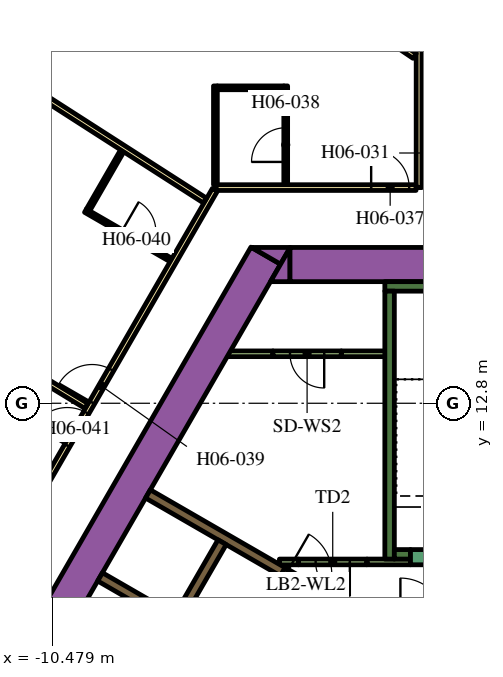
"""IFC4 building model, lengths in metres.
Left out: names, types, materials, properties, quantities, classifications, styles, units other than length and angle.
Written with IfcOpenShell. Run it as: python <this file> out.ifc"""

import sys

from ifc_helpers import new_model, si_unit, direction, frame, frame_2d, origin, place, context, subcontext, project, spatial, polyline, rectangle, outline, extrude, element, fill, save


model = new_model("IFC4")
c1 = context("Model", 3, precision=1e-05, world=origin(), true_north=direction((0.0, 1.0)))
c2 = subcontext(c1, "Body", "Model", "MODEL_VIEW")
j1 = project(units=[si_unit("LENGTHUNIT", "METRE"), si_unit("PLANEANGLEUNIT", "RADIAN")], contexts=[c1])
p1 = place(None, origin())
s1 = spatial("IfcSite", under=j1, at=p1, CompositionType="ELEMENT")
p2 = place(p1, origin())
s2 = spatial("IfcBuilding", under=s1, at=p2, CompositionType="ELEMENT")
p3 = place(p2, frame((0.0, 0.0, 87.6)))
s3 = spatial("IfcBuildingStorey", under=s2, at=p3, CompositionType="ELEMENT", Elevation=87.6)
p4 = place(p3, frame((-15.36, -1.503, 0.0), z_axis=(0.0, 0.0, 1.0), x_axis=(0.50000389221, 0.866023156604, 0.0)))
e1 = element("IfcWall", 1, at=p4, inside=s3, PredefinedType="SOLIDWALL", context=c2, shape_type="SweptSolid", body=[
    extrude(rectangle(XDim=21.0, YDim=0.9, at=frame_2d((10.5, 0.0))), origin(), (0.0, 0.0, 1.0), 3.9),
])
p5 = place(p3, origin())
e2 = element("IfcWall", 2, at=p5, inside=s3, PredefinedType="SOLIDWALL", context=c2, shape_type="SweptSolid", body=[
    extrude(outline(polyline([(-4.215, 16.9), (-4.469, 16.46), (-5.231, 16.9), (-4.215, 16.9)])), origin(), (0.0, 0.0, 1.0), 3.9),
])
p6 = place(p3, frame((-4.224, 16.45, 0.0), z_axis=(0.0, 0.0, 1.0), x_axis=(1.0, 0.0, 0.0)))
e3 = element("IfcWall", 3, at=p6, inside=s3, PredefinedType="SOLIDWALL", context=c2, shape_type="SweptSolid", body=[
    extrude(rectangle(XDim=9.488, YDim=0.9, at=frame_2d((4.744, 0.0))), origin(), (0.0, 0.0, 1.0), 3.9),
])
e4 = element("IfcWall", 4, at=p5, inside=s3, PredefinedType="SOLIDWALL", context=c2, shape_type="SweptSolid", body=[
    extrude(outline(polyline([(-4.734, 16.0), (-4.226, 16.88), (-4.226, 16.0), (-4.734, 16.0)])), origin(), (0.0, 0.0, 1.0), 3.9),
])
p7 = place(p3, frame((-1.725, 15.875, 0.0), z_axis=(0.0, 0.0, 1.0), x_axis=(1.0, 0.0, 0.0)))
e5 = element("IfcWall", 5, at=p7, inside=s3, PredefinedType="SOLIDWALL", context=c2, shape_type="SweptSolid", body=[
    extrude(rectangle(XDim=3.45, YDim=0.25, at=frame_2d((1.725, 0.0))), origin(), (0.0, 0.0, 1.0), 3.9),
])
p8 = place(p3, frame((-1.6, 8.7, 0.0), z_axis=(0.0, 0.0, 1.0), x_axis=(0.0, 1.0, 0.0)))
e6 = element("IfcWall", 6, at=p8, inside=s3, PredefinedType="SOLIDWALL", context=c2, shape_type="SweptSolid", body=[
    extrude(rectangle(XDim=7.05, YDim=0.25, at=frame_2d((3.525, 0.0))), origin(), (0.0, 0.0, 1.0), 3.9),
])
p9 = place(p3, frame((-1.475, 8.825, 0.0), z_axis=(0.0, 0.0, 1.0), x_axis=(1.0, 0.0, 0.0)))
e7 = element("IfcWall", 7, at=p9, inside=s3, PredefinedType="SOLIDWALL", context=c2, shape_type="SweptSolid", body=[
    extrude(rectangle(XDim=0.425, YDim=0.25, at=frame_2d((0.212, 0.0))), origin(), (0.0, 0.0, 1.0), 3.9),
])
e8 = element("IfcWall", 8, at=p5, inside=s3, PredefinedType="SOLIDWALL", context=c2, shape_type="SweptSolid", body=[
    extrude(outline(polyline([(-3.128, 7.481), (-3.259, 7.557), (-3.134, 7.773), (-3.003, 7.698), (-3.128, 7.481)])), origin(), (0.0, 0.0, 1.0), 3.9),
])
p10 = place(p3, frame((-7.314, 7.132, 0.0), z_axis=(0.0, 0.0, 1.0), x_axis=(-0.866008176907, 0.50002983664, 0.0)))
e9 = element("IfcWall", 9, at=p10, inside=s3, PredefinedType="SOLIDWALL", context=c2, shape_type="SweptSolid", body=[
    extrude(rectangle(XDim=2.2, YDim=0.25, at=frame_2d((1.1, 0.0))), origin(), (0.0, 0.0, 1.0), 3.9),
])
p11 = place(p3, frame((-7.959, 10.415, 0.0), z_axis=(0.0, 0.0, 1.0), x_axis=(0.866020958405, -0.500007699544, 0.0)))
e10 = element("IfcWall", 10, at=p11, inside=s3, PredefinedType="SOLIDWALL", context=c2, shape_type="SweptSolid", body=[
    extrude(rectangle(XDim=4.1, YDim=0.25, at=frame_2d((2.05, 0.0))), origin(), (0.0, 0.0, 1.0), 3.9),
])
p12 = place(p3, frame((-3.997, 8.625, 0.0), z_axis=(0.0, 0.0, 1.0), x_axis=(-1.0, 0.0, 0.0)))
e11 = element("IfcWall", 11, at=p12, inside=s3, PredefinedType="PARTITIONING", context=c2, shape_type="SweptSolid", body=[
    extrude(rectangle(XDim=0.502, YDim=0.15, at=frame_2d((0.251, 0.0))), origin(), (0.0, 0.0, 1.0), 2.75),
])
p13 = place(p3, frame((-5.851, 14.102, 0.0), z_axis=(0.0, 0.0, 1.0), x_axis=(1.0, 0.0, 0.0)))
e12 = element("IfcWall", 12, at=p13, inside=s3, PredefinedType="PARTITIONING", context=c2, shape_type="SweptSolid", body=[
    extrude(rectangle(XDim=1.18, YDim=0.15, at=frame_2d((0.59, 0.0))), origin(), (0.0, 0.0, 1.0), 2.75),
])
p14 = place(p3, frame((-2.871, 14.102, 0.0), z_axis=(0.0, 0.0, 1.0), x_axis=(1.0, 0.0, 0.0)))
e13 = element("IfcWall", 13, at=p14, inside=s3, PredefinedType="PARTITIONING", context=c2, shape_type="SweptSolid", body=[
    extrude(rectangle(XDim=1.196, YDim=0.15, at=frame_2d((0.598, 0.0))), origin(), (0.0, 0.0, 1.0), 2.75),
])
p15 = place(p3, frame((-2.196, 8.625, 0.0), z_axis=(0.0, 0.0, 1.0), x_axis=(1.0, 0.0, 0.0)))
e14 = element("IfcWall", 14, at=p15, inside=s3, PredefinedType="PARTITIONING", context=c2, shape_type="SweptSolid", body=[
    extrude(rectangle(XDim=1.146, YDim=0.15, at=frame_2d((0.573, 0.0))), origin(), (0.0, 0.0, 1.0), 2.75),
])
p16 = place(p3, frame((-6.008, 9.144, 0.0), z_axis=(0.0, 0.0, 1.0), x_axis=(-0.500006956611, -0.866021387346, 0.0)))
e15 = element("IfcWall", 15, at=p16, inside=s3, PredefinedType="SOLIDWALL", context=c2, shape_type="SweptSolid", body=[
    extrude(rectangle(XDim=9.83, YDim=0.25, at=frame_2d((4.915, 0.0))), origin(), (0.0, 0.0, 1.0), 3.9),
])
p17 = place(p16, frame((6.985, 0.0, 0.0)))
e16 = element("IfcOpeningElement", 16, at=p17, cuts=e15, PredefinedType="OPENING", context=c2, shape_type="SweptSolid", body=[
    extrude(rectangle(XDim=0.9, YDim=2.1, at=frame_2d((0.45, 1.05))), frame((0.0, 0.135, 0.0), z_axis=(0.0, -1.0, 0.0), x_axis=(1.0, 0.0, 0.0)), (0.0, 0.0, 1.0), 0.27),
])
p18 = place(p3, frame((1.05, 8.75, 0.0), z_axis=(0.0, 0.0, 1.0), x_axis=(-1.0, 0.0, 0.0)))
e17 = element("IfcWall", 17, at=p18, inside=s3, PredefinedType="SOLIDWALL", context=c2, shape_type="SweptSolid", body=[
    extrude(rectangle(XDim=2.1, YDim=0.4, at=frame_2d((1.05, 0.0))), origin(), (0.0, 0.0, 1.0), 3.9),
])
p19 = place(p18, frame((0.45, 0.0, 0.0)))
e18 = element("IfcOpeningElement", 18, at=p19, cuts=e17, PredefinedType="OPENING", context=c2, shape_type="SweptSolid", body=[
    extrude(rectangle(XDim=1.2, YDim=2.1, at=frame_2d((0.6, 1.05))), frame((0.0, 0.21, 0.0), z_axis=(0.0, -1.0, 0.0), x_axis=(1.0, 0.0, 0.0)), (0.0, 0.0, 1.0), 0.42),
])
p20 = place(p3, frame((-2.196, 8.625, 0.0), z_axis=(0.0, 0.0, 1.0), x_axis=(-1.0, 0.0, 0.0)))
e19 = element("IfcWall", 19, at=p20, inside=s3, PredefinedType="PARTITIONING", context=c2, shape_type="SweptSolid", body=[
    extrude(rectangle(XDim=1.8, YDim=0.15, at=frame_2d((0.9, 0.0))), origin(), (0.0, 0.0, 1.0), 2.75),
])
p21 = place(p20, frame((0.45, 0.0, 0.0)))
e20 = element("IfcOpeningElement", 20, at=p21, cuts=e19, PredefinedType="OPENING", context=c2, shape_type="SweptSolid", body=[
    extrude(rectangle(XDim=0.9, YDim=2.1, at=frame_2d((0.45, 1.05))), frame((0.0, 0.085, 0.0), z_axis=(0.0, -1.0, 0.0), x_axis=(1.0, 0.0, 0.0)), (0.0, 0.0, 1.0), 0.17),
])
p22 = place(p3, frame((-4.409, 8.365, 0.0), z_axis=(0.0, 0.0, 1.0), x_axis=(0.866034573852, -0.49998411664, 0.0)))
e21 = element("IfcWall", 21, at=p22, inside=s3, PredefinedType="SOLIDWALL", context=c2, shape_type="SweptSolid", body=[
    extrude(rectangle(XDim=1.4, YDim=0.25, at=frame_2d((0.7, 0.0))), origin(), (0.0, 0.0, 1.0), 3.9),
])
p23 = place(p22, frame((0.1, 0.0, 0.0)))
e22 = element("IfcOpeningElement", 22, at=p23, cuts=e21, PredefinedType="OPENING", context=c2, shape_type="SweptSolid", body=[
    extrude(rectangle(XDim=1.2, YDim=2.1, at=frame_2d((0.6, 1.05))), frame((0.0, 0.135, 0.0), z_axis=(0.0, -1.0, 0.0), x_axis=(1.0, 0.0, 0.0)), (0.0, 0.0, 1.0), 0.27),
])
p24 = place(p3, frame((-2.871, 14.102, 0.0), z_axis=(0.0, 0.0, 1.0), x_axis=(-1.0, 0.0, 0.0)))
e23 = element("IfcWall", 23, at=p24, inside=s3, PredefinedType="PARTITIONING", context=c2, shape_type="SweptSolid", body=[
    extrude(rectangle(XDim=1.8, YDim=0.15, at=frame_2d((0.9, 0.0))), origin(), (0.0, 0.0, 1.0), 2.75),
])
p25 = place(p24, frame((0.45, 0.0, 0.0)))
e24 = element("IfcOpeningElement", 24, at=p25, cuts=e23, PredefinedType="OPENING", context=c2, shape_type="SweptSolid", body=[
    extrude(rectangle(XDim=0.9, YDim=2.1, at=frame_2d((0.45, 1.05))), frame((0.0, 0.085, 0.0), z_axis=(0.0, -1.0, 0.0), x_axis=(1.0, 0.0, 0.0)), (0.0, 0.0, 1.0), 0.17),
])
p26 = place(p3, frame((-0.825, 18.475, 0.0), z_axis=(0.0, 0.0, 1.0), x_axis=(0.0, 1.0, 0.0)))
e25 = element("IfcWall", 25, at=p26, inside=s3, PredefinedType="PARTITIONING", context=c2, shape_type="SweptSolid", body=[
    extrude(rectangle(XDim=13.623, YDim=0.15, at=frame_2d((6.812, 0.0))), origin(), (0.0, 0.0, 1.0), 2.75),
])
p27 = place(p26, frame((4.135, 0.0, 0.0)))
e26 = element("IfcOpeningElement", 26, at=p27, cuts=e25, PredefinedType="OPENING", context=c2, shape_type="SweptSolid", body=[
    extrude(rectangle(XDim=1.0, YDim=2.1, at=frame_2d((0.5, 1.05))), frame((0.0, 0.085, 0.0), z_axis=(0.0, -1.0, 0.0), x_axis=(1.0, 0.0, 0.0)), (0.0, 0.0, 1.0), 0.17),
])
p28 = place(p3, frame((-6.163, 18.475, 0.0), z_axis=(0.0, 0.0, 1.0), x_axis=(1.0, 0.0, 0.0)))
e27 = element("IfcWall", 27, at=p28, inside=s3, PredefinedType="PARTITIONING", context=c2, shape_type="SweptSolid", body=[
    extrude(rectangle(XDim=5.258, YDim=0.15, at=frame_2d((2.629, 0.0))), origin(), (0.0, 0.0, 1.0), 2.75),
])
p29 = place(p28, frame((4.078, 0.0, 0.0)))
e28 = element("IfcOpeningElement", 28, at=p29, cuts=e27, PredefinedType="OPENING", context=c2, shape_type="SweptSolid", body=[
    extrude(rectangle(XDim=1.0, YDim=2.1, at=frame_2d((0.5, 1.05))), frame((0.0, 0.085, 0.0), z_axis=(0.0, -1.0, 0.0), x_axis=(1.0, 0.0, 0.0)), (0.0, 0.0, 1.0), 0.17),
])
p30 = place(p3, frame((-19.081, -3.9, 0.0), z_axis=(0.0, 0.0, 1.0), x_axis=(0.499998313975, 0.866026377209, 0.0)))
e29 = element("IfcWall", 29, at=p30, inside=s3, PredefinedType="PARTITIONING", context=c2, shape_type="SweptSolid", body=[
    extrude(rectangle(XDim=25.766, YDim=0.15, at=frame_2d((12.883, 0.0))), origin(), (0.0, 0.0, 1.0), 2.75),
])
p31 = place(p30, frame((19.306, 0.0, 0.0)))
e30 = element("IfcOpeningElement", 30, at=p31, cuts=e29, PredefinedType="OPENING", context=c2, shape_type="SweptSolid", body=[
    extrude(rectangle(XDim=1.0, YDim=2.1, at=frame_2d((0.5, 1.05))), frame((0.0, 0.085, 0.0), z_axis=(0.0, -1.0, 0.0), x_axis=(1.0, 0.0, 0.0)), (0.0, 0.0, 1.0), 0.17),
])
p32 = place(p30, frame((18.0, 0.0, 0.0)))
e31 = element("IfcOpeningElement", 31, at=p32, cuts=e29, PredefinedType="OPENING", context=c2, shape_type="SweptSolid", body=[
    extrude(rectangle(XDim=1.0, YDim=2.1, at=frame_2d((0.5, 1.05))), frame((0.0, 0.085, 0.0), z_axis=(0.0, -1.0, 0.0), x_axis=(1.0, 0.0, 0.0)), (0.0, 0.0, 1.0), 0.17),
])
p33 = place(p30, frame((10.874, 0.0, 0.0)))
e32 = element("IfcOpeningElement", 32, at=p33, cuts=e29, PredefinedType="OPENING", context=c2, shape_type="SweptSolid", body=[
    extrude(rectangle(XDim=0.9, YDim=2.1, at=frame_2d((0.45, 1.05))), frame((0.0, 0.085, 0.0), z_axis=(0.0, -1.0, 0.0), x_axis=(1.0, 0.0, 0.0)), (0.0, 0.0, 1.0), 0.17),
])
p34 = place(p30, frame((8.548, 0.0, 0.0)))
e33 = element("IfcOpeningElement", 33, at=p34, cuts=e29, PredefinedType="OPENING", context=c2, shape_type="SweptSolid", body=[
    extrude(rectangle(XDim=1.1, YDim=2.1, at=frame_2d((0.55, 1.05))), frame((0.0, 0.085, 0.0), z_axis=(0.0, -1.0, 0.0), x_axis=(1.0, 0.0, 0.0)), (0.0, 0.0, 1.0), 0.17),
])
p35 = place(p30, frame((0.18, 0.0, 0.0)))
e34 = element("IfcOpeningElement", 34, at=p35, cuts=e29, PredefinedType="OPENING", context=c2, shape_type="SweptSolid", body=[
    extrude(rectangle(XDim=1.0, YDim=2.1, at=frame_2d((0.5, 1.05))), frame((0.0, 0.085, 0.0), z_axis=(0.0, -1.0, 0.0), x_axis=(1.0, 0.0, 0.0)), (0.0, 0.0, 1.0), 0.17),
])
p36 = place(p3, frame((-15.225, 16.167, 0.0), z_axis=(0.0, 0.0, 1.0), x_axis=(0.854088713274, -0.520127359266, 0.0)))
e35 = element("IfcWall", 35, at=p36, inside=s3, PredefinedType="PARTITIONING", context=c2, shape_type="SweptSolid", body=[
    extrude(rectangle(XDim=6.611, YDim=0.15, at=frame_2d((3.305, 0.0))), origin(), (0.0, 0.0, 1.0), 2.75),
])
p37 = place(p3, frame((-11.838, 21.585, 0.0), z_axis=(0.0, 0.0, 1.0), x_axis=(0.841699322813, -0.539946525108, 0.0)))
e36 = element("IfcWall", 36, at=p37, inside=s3, PredefinedType="PARTITIONING", context=c2, shape_type="SweptSolid", body=[
    extrude(rectangle(XDim=6.392, YDim=0.15, at=frame_2d((3.196, 0.0))), origin(), (0.0, 0.0, 1.0), 2.75),
])
p38 = place(p3, frame((-8.326, 26.923, 0.0), z_axis=(0.0, 0.0, 1.0), x_axis=(0.828836601893, -0.5594907393, 0.0)))
e37 = element("IfcWall", 37, at=p38, inside=s3, PredefinedType="PARTITIONING", context=c2, shape_type="SweptSolid", body=[
    extrude(rectangle(XDim=8.909, YDim=0.15, at=frame_2d((4.455, 0.0))), origin(), (0.0, 0.0, 1.0), 2.75),
])
p39 = place(p3, frame((-4.333, 18.55, 0.0), z_axis=(0.0, 0.0, 1.0), x_axis=(0.0, 1.0, 0.0)))
e38 = element("IfcWall", 38, at=p39, inside=s3, PredefinedType="PARTITIONING", context=c2, shape_type="SweptSolid", body=[
    extrude(rectangle(XDim=2.6, YDim=0.1, at=frame_2d((1.3, 0.0))), origin(), (0.0, 0.0, 1.0), 2.75),
])
p40 = place(p39, frame((0.6, 0.0, 0.0)))
e39 = element("IfcOpeningElement", 39, at=p40, cuts=e38, PredefinedType="OPENING", context=c2, shape_type="SweptSolid", body=[
    extrude(rectangle(XDim=0.9, YDim=2.1, at=frame_2d((0.45, 1.05))), frame((0.0, 0.06, 0.0), z_axis=(0.0, -1.0, 0.0), x_axis=(1.0, 0.0, 0.0)), (0.0, 0.0, 1.0), 0.12),
])
p41 = place(p3, frame((-4.383, 21.1, 0.0), z_axis=(0.0, 0.0, 1.0), x_axis=(-1.0, 0.0, 0.0)))
e40 = element("IfcWall", 40, at=p41, inside=s3, PredefinedType="PARTITIONING", context=c2, shape_type="SweptSolid", body=[
    extrude(rectangle(XDim=1.75, YDim=0.1, at=frame_2d((0.875, 0.0))), origin(), (0.0, 0.0, 1.0), 2.75),
])
p42 = place(p3, frame((-6.183, 18.55, 0.0), z_axis=(0.0, 0.0, 1.0), x_axis=(0.0, 1.0, 0.0)))
e41 = element("IfcWall", 41, at=p42, inside=s3, PredefinedType="PARTITIONING", context=c2, shape_type="SweptSolid", body=[
    extrude(rectangle(XDim=2.6, YDim=0.1, at=frame_2d((1.3, 0.0))), origin(), (0.0, 0.0, 1.0), 2.75),
])
p43 = place(p3, frame((-9.603, 17.868, 0.0), z_axis=(0.0, 0.0, 1.0), x_axis=(0.866021400173, -0.500006934395, 0.0)))
e42 = element("IfcWall", 42, at=p43, inside=s3, PredefinedType="PARTITIONING", context=c2, shape_type="SweptSolid", body=[
    extrude(rectangle(XDim=2.6, YDim=0.1, at=frame_2d((1.3, 0.0))), origin(), (0.0, 0.0, 1.0), 2.75),
])
p44 = place(p43, frame((1.1, 0.0, 0.0)))
e43 = element("IfcOpeningElement", 43, at=p44, cuts=e42, PredefinedType="OPENING", context=c2, shape_type="SweptSolid", body=[
    extrude(rectangle(XDim=0.9, YDim=2.1, at=frame_2d((0.45, 1.05))), frame((0.0, 0.06, 0.0), z_axis=(0.0, -1.0, 0.0), x_axis=(1.0, 0.0, 0.0)), (0.0, 0.0, 1.0), 0.12),
])
p45 = place(p3, frame((-9.534, 17.886, 0.0), z_axis=(0.0, 0.0, 1.0), x_axis=(0.500041240653, 0.866001592173, 0.0)))
e44 = element("IfcWall", 44, at=p45, inside=s3, PredefinedType="PARTITIONING", context=c2, shape_type="SweptSolid", body=[
    extrude(rectangle(XDim=1.79, YDim=0.1, at=frame_2d((0.895, 0.0))), origin(), (0.0, 0.0, 1.0), 2.75),
])
p46 = place(p21, origin())
e45 = element("IfcDoor", 45, at=p46, inside=s3, OperationType="SINGLE_SWING_LEFT", PredefinedType="DOOR", context=c2, shape_type="SweptSolid", body=[
    extrude(rectangle(XDim=0.9, YDim=2.1, at=frame_2d((0.45, 1.05))), frame((0.0, 0.025, 0.0), z_axis=(0.0, -1.0, 0.0), x_axis=(1.0, 0.0, 0.0)), (0.0, 0.0, 1.0), 0.05),
])
fill(e20, e45)
p47 = place(p23, origin())
e46 = element("IfcDoor", 46, at=p47, inside=s3, OperationType="SINGLE_SWING_LEFT", PredefinedType="DOOR", context=c2, shape_type="SweptSolid", body=[
    extrude(rectangle(XDim=1.2, YDim=2.1, at=frame_2d((0.6, 1.05))), frame((0.0, 0.025, 0.0), z_axis=(0.0, -1.0, 0.0), x_axis=(1.0, 0.0, 0.0)), (0.0, 0.0, 1.0), 0.05),
])
fill(e22, e46)
p48 = place(p25, origin())
e47 = element("IfcDoor", 47, at=p48, inside=s3, OperationType="SINGLE_SWING_LEFT", PredefinedType="DOOR", context=c2, shape_type="SweptSolid", body=[
    extrude(rectangle(XDim=0.9, YDim=2.1, at=frame_2d((0.45, 1.05))), frame((0.0, 0.025, 0.0), z_axis=(0.0, -1.0, 0.0), x_axis=(1.0, 0.0, 0.0)), (0.0, 0.0, 1.0), 0.05),
])
fill(e24, e47)
p49 = place(p29, origin())
e48 = element("IfcDoor", 48, at=p49, inside=s3, OperationType="SINGLE_SWING_RIGHT", PredefinedType="DOOR", context=c2, shape_type="SweptSolid", body=[
    extrude(rectangle(XDim=1.0, YDim=2.1, at=frame_2d((0.5, 1.05))), frame((0.0, 0.025, 0.0), z_axis=(0.0, -1.0, 0.0), x_axis=(1.0, 0.0, 0.0)), (0.0, 0.0, 1.0), 0.05),
])
fill(e28, e48)
p50 = place(p40, origin())
e49 = element("IfcDoor", 49, at=p50, inside=s3, OperationType="SINGLE_SWING_LEFT", PredefinedType="DOOR", context=c2, shape_type="SweptSolid", body=[
    extrude(rectangle(XDim=0.9, YDim=2.1, at=frame_2d((0.45, 1.05))), frame((0.0, 0.025, 0.0), z_axis=(0.0, -1.0, 0.0), x_axis=(1.0, 0.0, 0.0)), (0.0, 0.0, 1.0), 0.05),
])
fill(e39, e49)
p51 = place(p31, origin())
e50 = element("IfcDoor", 50, at=p51, inside=s3, OperationType="SINGLE_SWING_LEFT", PredefinedType="DOOR", context=c2, shape_type="SweptSolid", body=[
    extrude(rectangle(XDim=1.0, YDim=2.1, at=frame_2d((0.5, 1.05))), frame((0.0, 0.025, 0.0), z_axis=(0.0, -1.0, 0.0), x_axis=(1.0, 0.0, 0.0)), (0.0, 0.0, 1.0), 0.05),
])
fill(e30, e50)
p52 = place(p44, origin())
e51 = element("IfcDoor", 51, at=p52, inside=s3, OperationType="SINGLE_SWING_RIGHT", PredefinedType="DOOR", context=c2, shape_type="SweptSolid", body=[
    extrude(rectangle(XDim=0.9, YDim=2.1, at=frame_2d((0.45, 1.05))), frame((0.0, 0.025, 0.0), z_axis=(0.0, -1.0, 0.0), x_axis=(1.0, 0.0, 0.0)), (0.0, 0.0, 1.0), 0.05),
])
fill(e43, e51)
p53 = place(p32, origin())
e52 = element("IfcDoor", 52, at=p53, inside=s3, OperationType="SINGLE_SWING_RIGHT", PredefinedType="DOOR", context=c2, shape_type="SweptSolid", body=[
    extrude(rectangle(XDim=1.0, YDim=2.1, at=frame_2d((0.5, 1.05))), frame((0.0, 0.025, 0.0), z_axis=(0.0, -1.0, 0.0), x_axis=(1.0, 0.0, 0.0)), (0.0, 0.0, 1.0), 0.05),
])
fill(e31, e52)
save(model, sys.argv[1])
